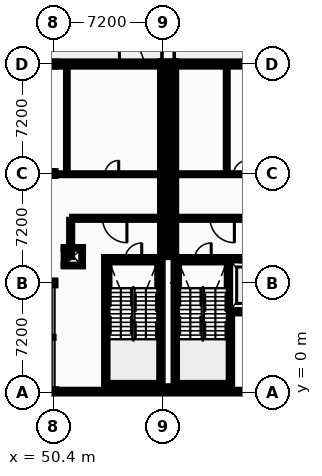
"""IFC4 building model, lengths in metres.
Left out: names, types, materials, properties, quantities, classifications, styles, units other than length and angle.
Written with IfcOpenShell. Run it as: python <this file> out.ifc"""

import sys

from ifc_helpers import new_model, si_unit, direction, frame, frame_2d, origin, origin_2d, place, context, subcontext, project, spatial, rectangle, hollow_circle, i_section, extrude, element, fill, save


model = new_model("IFC4")
c1 = context("Model", 3, precision=1e-05, world=origin(), true_north=direction((0.0, 1.0)))
c2 = subcontext(c1, "Body", "Model", "MODEL_VIEW")
j1 = project(units=[si_unit("LENGTHUNIT", "METRE"), si_unit("PLANEANGLEUNIT", "RADIAN")], contexts=[c1])
p1 = place(None, origin())
s1 = spatial("IfcSite", under=j1, at=p1, CompositionType="ELEMENT")
p2 = place(p1, origin())
s2 = spatial("IfcBuilding", under=s1, at=p2, CompositionType="ELEMENT")
p3 = place(p2, frame((0.0, 0.0, 14.0)))
s3 = spatial("IfcBuildingStorey", under=s2, at=p3, CompositionType="ELEMENT", Elevation=14.0)
p4 = place(p3, frame((50.4, 0.0, 0.0), z_axis=(0.0, 0.0, 1.0), x_axis=(1.0, 0.0, 0.0)))
e1 = element("IfcColumn", 1, at=p4, inside=s3, PredefinedType="COLUMN", context=c2, shape_type="SweptSolid", body=[
    extrude(hollow_circle(Radius=0.203, WallThickness=0.016, at=origin_2d()), origin(), (0.0, 0.0, 1.0), 4.4),
])
for number, where, z_axis, x_axis in (
    (2, (50.4, 7.2, 0.0), (0.0, 0.0, 1.0), (1.0, 0.0, 0.0)),
    (3, (50.4, 14.4, 0.0), (0.0, 0.0, 1.0), (1.0, 0.0, 0.0)),
    (4, (50.4, 21.6, 0.0), (0.0, 0.0, 1.0), (1.0, 0.0, 0.0)),
    (5, (57.6, 0.0, 0.0), (0.0, 0.0, 1.0), (1.0, 0.0, 0.0)),
    (6, (57.6, 14.4, 0.0), (0.0, 0.0, 1.0), (1.0, 0.0, 0.0)),
    (7, (57.6, 21.6, 0.0), (0.0, 0.0, 1.0), (1.0, 0.0, 0.0)),
    (8, (58.32, 0.0, 0.0), (0.0, 0.0, 1.0), (1.0, 0.0, 0.0)),
    (9, (58.32, 14.4, 0.0), (0.0, 0.0, 1.0), (1.0, 0.0, 0.0)),
    (10, (58.32, 21.6, 0.0), (0.0, 0.0, 1.0), (1.0, 0.0, 0.0)),
):
    element("IfcColumn", number, at=place(p3, frame(where, z_axis=z_axis, x_axis=x_axis)), inside=s3, PredefinedType="COLUMN", context=c2, shape_type="SweptSolid", body=[
        extrude(i_section(OverallWidth=0.3, OverallDepth=0.32, WebThickness=0.011, FlangeThickness=0.021, FilletRadius=0.027, at=origin_2d()), origin(), (0.0, 0.0, 1.0), 4.4),
    ])
p5 = place(p3, frame((50.29, 0.0, 0.0), z_axis=(0.0, 0.0, 1.0), x_axis=(1.0, 0.0, 0.0)))
e11 = element("IfcWall", 11, at=p5, inside=s3, PredefinedType="STANDARD", context=c2, shape_type="SweptSolid", body=[
    extrude(rectangle(XDim=7.14, YDim=0.34, at=frame_2d((3.57, 0.0))), origin(), (0.0, 0.0, 1.0), 3.935),
])
p6 = place(p5, frame((1.525, 0.0, 0.95)))
e12 = element("IfcOpeningElement", 12, at=p6, cuts=e11, PredefinedType="OPENING", context=c2, shape_type="SweptSolid", body=[
    extrude(rectangle(XDim=1.234, YDim=1.368, at=frame_2d((0.617, 0.684))), frame((0.0, 0.18, 0.0), z_axis=(0.0, -1.0, 0.0), x_axis=(1.0, 0.0, 0.0)), (0.0, 0.0, 1.0), 0.36),
])
p7 = place(p5, frame((4.381, 0.0, 0.95)))
e13 = element("IfcOpeningElement", 13, at=p7, cuts=e11, PredefinedType="OPENING", context=c2, shape_type="SweptSolid", body=[
    extrude(rectangle(XDim=1.234, YDim=1.368, at=frame_2d((0.617, 0.684))), frame((0.0, 0.18, 0.0), z_axis=(0.0, -1.0, 0.0), x_axis=(1.0, 0.0, 0.0)), (0.0, 0.0, 1.0), 0.36),
])
p8 = place(p3, frame((57.43, 21.6, 0.0), z_axis=(0.0, 0.0, 1.0), x_axis=(-1.0, 0.0, 0.0)))
e14 = element("IfcWall", 14, at=p8, inside=s3, PredefinedType="STANDARD", context=c2, shape_type="SweptSolid", body=[
    extrude(rectangle(XDim=7.14, YDim=0.34, at=frame_2d((3.57, 0.0))), origin(), (0.0, 0.0, 1.0), 3.935),
])
p9 = place(p8, frame((1.072, 0.0, 0.0)))
e15 = element("IfcOpeningElement", 15, at=p9, cuts=e14, PredefinedType="OPENING", context=c2, shape_type="SweptSolid", body=[
    extrude(rectangle(XDim=1.6, YDim=2.2, at=frame_2d((0.8, 1.1))), frame((0.0, 0.18, 0.0), z_axis=(0.0, -1.0, 0.0), x_axis=(1.0, 0.0, 0.0)), (0.0, 0.0, 1.0), 0.36),
])
p10 = place(p3, frame((57.6, -0.17, 0.0), z_axis=(0.0, 0.0, 1.0), x_axis=(0.0, 1.0, 0.0)))
e16 = element("IfcWall", 16, at=p10, inside=s3, PredefinedType="STANDARD", context=c2, shape_type="SweptSolid", body=[
    extrude(rectangle(XDim=0.57, YDim=0.34, at=frame_2d((0.285, 0.0))), origin(), (0.0, 0.0, 1.0), 4.2),
])
p11 = place(p3, frame((57.6, 8.9, 0.0), z_axis=(0.0, 0.0, 1.0), x_axis=(0.0, 1.0, 0.0)))
e17 = element("IfcWall", 17, at=p11, inside=s3, PredefinedType="STANDARD", context=c2, shape_type="SweptSolid", body=[
    extrude(rectangle(XDim=5.5, YDim=0.34, at=frame_2d((2.75, 0.0))), origin(), (0.0, 0.0, 1.0), 4.2),
])
p12 = place(p3, frame((57.6, 14.4, 0.0), z_axis=(0.0, 0.0, 1.0), x_axis=(0.0, 1.0, 0.0)))
e18 = element("IfcWall", 18, at=p12, inside=s3, PredefinedType="STANDARD", context=c2, shape_type="SweptSolid", body=[
    extrude(rectangle(XDim=7.37, YDim=0.34, at=frame_2d((3.685, 0.0))), origin(), (0.0, 0.0, 1.0), 3.895),
])
p13 = place(p12, frame((1.679, 0.0, 0.95)))
e19 = element("IfcOpeningElement", 19, at=p13, cuts=e18, PredefinedType="OPENING", context=c2, shape_type="SweptSolid", body=[
    extrude(rectangle(XDim=1.064, YDim=1.404, at=frame_2d((0.532, 0.702))), frame((0.0, 0.18, 0.0), z_axis=(0.0, -1.0, 0.0), x_axis=(1.0, 0.0, 0.0)), (0.0, 0.0, 1.0), 0.36),
])
p14 = place(p12, frame((4.627, 0.0, 0.95)))
e20 = element("IfcOpeningElement", 20, at=p14, cuts=e18, PredefinedType="OPENING", context=c2, shape_type="SweptSolid", body=[
    extrude(rectangle(XDim=1.064, YDim=1.404, at=frame_2d((0.532, 0.702))), frame((0.0, 0.18, 0.0), z_axis=(0.0, -1.0, 0.0), x_axis=(1.0, 0.0, 0.0)), (0.0, 0.0, 1.0), 0.36),
])
p15 = place(p3, frame((58.49, 0.0, 0.0), z_axis=(0.0, 0.0, 1.0), x_axis=(1.0, 0.0, 0.0)))
e21 = element("IfcWall", 21, at=p15, inside=s3, PredefinedType="STANDARD", context=c2, shape_type="SweptSolid", body=[
    extrude(rectangle(XDim=6.31, YDim=0.34, at=frame_2d((3.155, 0.0))), origin(), (0.0, 0.0, 1.0), 3.935),
])
p16 = place(p3, frame((64.91, 21.6, 0.0), z_axis=(0.0, 0.0, 1.0), x_axis=(-1.0, 0.0, 0.0)))
e22 = element("IfcWall", 22, at=p16, inside=s3, PredefinedType="STANDARD", context=c2, shape_type="SweptSolid", body=[
    extrude(rectangle(XDim=6.42, YDim=0.34, at=frame_2d((3.21, 0.0))), origin(), (0.0, 0.0, 1.0), 3.935),
])
p17 = place(p3, frame((58.32, 0.4, 0.0), z_axis=(0.0, 0.0, 1.0), x_axis=(0.0, -1.0, 0.0)))
e23 = element("IfcWall", 23, at=p17, inside=s3, PredefinedType="STANDARD", context=c2, shape_type="SweptSolid", body=[
    extrude(rectangle(XDim=0.57, YDim=0.34, at=frame_2d((0.285, 0.0))), origin(), (0.0, 0.0, 1.0), 4.2),
])
p18 = place(p3, frame((58.32, 14.4, 0.0), z_axis=(0.0, 0.0, 1.0), x_axis=(0.0, -1.0, 0.0)))
e24 = element("IfcWall", 24, at=p18, inside=s3, PredefinedType="STANDARD", context=c2, shape_type="SweptSolid", body=[
    extrude(rectangle(XDim=5.5, YDim=0.34, at=frame_2d((2.75, 0.0))), origin(), (0.0, 0.0, 1.0), 4.2),
])
p19 = place(p3, frame((58.32, 21.77, 0.0), z_axis=(0.0, 0.0, 1.0), x_axis=(0.0, -1.0, 0.0)))
e25 = element("IfcWall", 25, at=p19, inside=s3, PredefinedType="STANDARD", context=c2, shape_type="SweptSolid", body=[
    extrude(rectangle(XDim=7.37, YDim=0.34, at=frame_2d((3.685, 0.0))), origin(), (0.0, 0.0, 1.0), 3.895),
])
p20 = place(p19, frame((1.764, 0.0, 0.95)))
e26 = element("IfcOpeningElement", 26, at=p20, cuts=e25, PredefinedType="OPENING", context=c2, shape_type="SweptSolid", body=[
    extrude(rectangle(XDim=0.894, YDim=1.368, at=frame_2d((0.447, 0.684))), frame((0.0, 0.18, 0.0), z_axis=(0.0, -1.0, 0.0), x_axis=(1.0, 0.0, 0.0)), (0.0, 0.0, 1.0), 0.36),
])
p21 = place(p19, frame((4.712, 0.0, 0.95)))
e27 = element("IfcOpeningElement", 27, at=p21, cuts=e25, PredefinedType="OPENING", context=c2, shape_type="SweptSolid", body=[
    extrude(rectangle(XDim=0.894, YDim=1.368, at=frame_2d((0.447, 0.684))), frame((0.0, 0.18, 0.0), z_axis=(0.0, -1.0, 0.0), x_axis=(1.0, 0.0, 0.0)), (0.0, 0.0, 1.0), 0.36),
])
p22 = place(p3, frame((54.1, 0.575, 0.0), z_axis=(0.0, 0.0, 1.0), x_axis=(1.0, 0.0, 0.0)))
e28 = element("IfcWall", 28, at=p22, inside=s3, PredefinedType="SHEAR", context=c2, shape_type="SweptSolid", body=[
    extrude(rectangle(XDim=3.15, YDim=0.35, at=frame_2d((1.575, 0.0))), origin(), (0.0, 0.0, 1.0), 4.2),
])
p23 = place(p3, frame((54.1, 8.725, 0.0), z_axis=(0.0, 0.0, 1.0), x_axis=(1.0, 0.0, 0.0)))
e29 = element("IfcWall", 29, at=p23, inside=s3, PredefinedType="SHEAR", context=c2, shape_type="SweptSolid", body=[
    extrude(rectangle(XDim=3.15, YDim=0.35, at=frame_2d((1.575, 0.0))), origin(), (0.0, 0.0, 1.0), 4.2),
])
p24 = place(p23, frame((1.025, 0.0, 0.0)))
e30 = element("IfcOpeningElement", 30, at=p24, cuts=e29, PredefinedType="OPENING", context=c2, shape_type="SweptSolid", body=[
    extrude(rectangle(XDim=1.1, YDim=2.15, at=frame_2d((0.55, 1.075))), frame((0.0, 0.185, 0.0), z_axis=(0.0, -1.0, 0.0), x_axis=(1.0, 0.0, 0.0)), (0.0, 0.0, 1.0), 0.37),
])
for number, where, z_axis, x_axis in (
    (31, (53.925, 0.4, 0.0), (0.0, 0.0, 1.0), (0.0, 1.0, 0.0)),
    (32, (57.425, 0.4, 0.0), (0.0, 0.0, 1.0), (0.0, 1.0, 0.0)),
):
    element("IfcWall", number, at=place(p3, frame(where, z_axis=z_axis, x_axis=x_axis)), inside=s3, PredefinedType="SHEAR", context=c2, shape_type="SweptSolid", body=[
        extrude(rectangle(XDim=8.5, YDim=0.35, at=frame_2d((4.25, 0.0))), origin(), (0.0, 0.0, 1.0), 4.2),
    ])
p25 = place(p3, frame((51.65, 11.45, 0.0), z_axis=(0.0, 0.0, 1.0), x_axis=(1.0, 0.0, 0.0)))
e33 = element("IfcWall", 33, at=p25, inside=s3, PredefinedType="PARTITIONING", context=c2, shape_type="SweptSolid", body=[
    extrude(rectangle(XDim=5.6, YDim=0.2, at=frame_2d((2.8, 0.0))), origin(), (0.0, 0.0, 1.0), 4.2),
])
p26 = place(p25, frame((2.0, 0.0, 0.0)))
e34 = element("IfcOpeningElement", 34, at=p26, cuts=e33, PredefinedType="OPENING", context=c2, shape_type="SweptSolid", body=[
    extrude(rectangle(XDim=1.6, YDim=2.2, at=frame_2d((0.8, 1.1))), frame((0.0, 0.11, 0.0), z_axis=(0.0, -1.0, 0.0), x_axis=(1.0, 0.0, 0.0)), (0.0, 0.0, 1.0), 0.22),
])
p27 = place(p3, frame((51.55, 8.9, 0.0), z_axis=(0.0, 0.0, 1.0), x_axis=(0.0, 1.0, 0.0)))
e35 = element("IfcWall", 35, at=p27, inside=s3, PredefinedType="PARTITIONING", context=c2, shape_type="SweptSolid", body=[
    extrude(rectangle(XDim=2.45, YDim=0.2, at=frame_2d((1.225, 0.0))), origin(), (0.0, 0.0, 1.0), 4.2),
])
p28 = place(p3, frame((58.67, 0.575, 0.0), z_axis=(0.0, 0.0, 1.0), x_axis=(1.0, 0.0, 0.0)))
e36 = element("IfcWall", 36, at=p28, inside=s3, PredefinedType="SHEAR", context=c2, shape_type="SweptSolid", body=[
    extrude(rectangle(XDim=3.15, YDim=0.35, at=frame_2d((1.575, 0.0))), origin(), (0.0, 0.0, 1.0), 4.2),
])
p29 = place(p3, frame((58.67, 8.725, 0.0), z_axis=(0.0, 0.0, 1.0), x_axis=(1.0, 0.0, 0.0)))
e37 = element("IfcWall", 37, at=p29, inside=s3, PredefinedType="SHEAR", context=c2, shape_type="SweptSolid", body=[
    extrude(rectangle(XDim=3.15, YDim=0.35, at=frame_2d((1.575, 0.0))), origin(), (0.0, 0.0, 1.0), 4.2),
])
p30 = place(p29, frame((1.025, 0.0, 0.0)))
e38 = element("IfcOpeningElement", 38, at=p30, cuts=e37, PredefinedType="OPENING", context=c2, shape_type="SweptSolid", body=[
    extrude(rectangle(XDim=1.1, YDim=2.15, at=frame_2d((0.55, 1.075))), frame((0.0, 0.185, 0.0), z_axis=(0.0, -1.0, 0.0), x_axis=(1.0, 0.0, 0.0)), (0.0, 0.0, 1.0), 0.37),
])
for number, where, z_axis, x_axis in (
    (39, (58.495, 0.4, 0.0), (0.0, 0.0, 1.0), (0.0, 1.0, 0.0)),
    (40, (61.995, 0.4, 0.0), (0.0, 0.0, 1.0), (0.0, 1.0, 0.0)),
):
    element("IfcWall", number, at=place(p3, frame(where, z_axis=z_axis, x_axis=x_axis)), inside=s3, PredefinedType="SHEAR", context=c2, shape_type="SweptSolid", body=[
        extrude(rectangle(XDim=8.5, YDim=0.35, at=frame_2d((4.25, 0.0))), origin(), (0.0, 0.0, 1.0), 4.2),
    ])
p31 = place(p3, frame((62.17, 5.375, 0.0), z_axis=(0.0, 0.0, 1.0), x_axis=(1.0, 0.0, 0.0)))
e41 = element("IfcWall", 41, at=p31, inside=s3, PredefinedType="SHEAR", context=c2, shape_type="SweptSolid", body=[
    extrude(rectangle(XDim=2.2, YDim=0.35, at=frame_2d((1.1, 0.0))), origin(), (0.0, 0.0, 1.0), 4.2),
])
p32 = place(p3, frame((62.17, 8.725, 0.0), z_axis=(0.0, 0.0, 1.0), x_axis=(1.0, 0.0, 0.0)))
e42 = element("IfcWall", 42, at=p32, inside=s3, PredefinedType="SHEAR", context=c2, shape_type="SweptSolid", body=[
    extrude(rectangle(XDim=2.2, YDim=0.35, at=frame_2d((1.1, 0.0))), origin(), (0.0, 0.0, 1.0), 4.2),
])
p33 = place(p32, frame((0.5, 0.0, 0.0)))
e43 = element("IfcOpeningElement", 43, at=p33, cuts=e42, PredefinedType="OPENING", context=c2, shape_type="SweptSolid", body=[
    extrude(rectangle(XDim=1.2, YDim=2.2, at=frame_2d((0.6, 1.1))), frame((0.0, 0.185, 0.0), z_axis=(0.0, -1.0, 0.0), x_axis=(1.0, 0.0, 0.0)), (0.0, 0.0, 1.0), 0.37),
])
p34 = place(p3, frame((58.67, 11.45, 0.0), z_axis=(0.0, 0.0, 1.0), x_axis=(1.0, 0.0, 0.0)))
e44 = element("IfcWall", 44, at=p34, inside=s3, PredefinedType="PARTITIONING", context=c2, shape_type="SweptSolid", body=[
    extrude(rectangle(XDim=5.7, YDim=0.2, at=frame_2d((2.85, 0.0))), origin(), (0.0, 0.0, 1.0), 4.2),
])
p35 = place(p34, frame((2.05, 0.0, 0.0)))
e45 = element("IfcOpeningElement", 45, at=p35, cuts=e44, PredefinedType="OPENING", context=c2, shape_type="SweptSolid", body=[
    extrude(rectangle(XDim=1.6, YDim=2.2, at=frame_2d((0.8, 1.1))), frame((0.0, 0.11, 0.0), z_axis=(0.0, -1.0, 0.0), x_axis=(1.0, 0.0, 0.0)), (0.0, 0.0, 1.0), 0.22),
])
for number, where, z_axis, x_axis in (
    (46, (51.09, 8.345, 0.0), (0.0, 0.0, 1.0), (1.0, 0.0, 0.0)),
    (47, (51.09, 9.505, 0.0), (0.0, 0.0, 1.0), (1.0, 0.0, 0.0)),
):
    element("IfcWall", number, at=place(p3, frame(where, z_axis=z_axis, x_axis=x_axis)), inside=s3, PredefinedType="PARTITIONING", context=c2, shape_type="SweptSolid", body=[
        extrude(rectangle(XDim=1.27, YDim=0.11, at=frame_2d((0.635, 0.0))), origin(), (0.0, 0.0, 1.0), 4.2),
    ])
for number, where, z_axis, x_axis in (
    (48, (51.145, 8.4, 0.0), (0.0, 0.0, 1.0), (0.0, 1.0, 0.0)),
    (49, (52.305, 8.4, 0.0), (0.0, 0.0, 1.0), (0.0, 1.0, 0.0)),
):
    element("IfcWall", number, at=place(p3, frame(where, z_axis=z_axis, x_axis=x_axis)), inside=s3, PredefinedType="PARTITIONING", context=c2, shape_type="SweptSolid", body=[
        extrude(rectangle(XDim=1.05, YDim=0.11, at=frame_2d((0.525, 0.0))), origin(), (0.0, 0.0, 1.0), 4.2),
    ])
p36 = place(p3, frame((50.78, 14.35, 0.0), z_axis=(0.0, 0.0, 1.0), x_axis=(1.0, 0.0, 0.0)))
e50 = element("IfcWall", 50, at=p36, inside=s3, PredefinedType="PARTITIONING", context=c2, shape_type="SweptSolid", body=[
    extrude(rectangle(XDim=6.44, YDim=0.125, at=frame_2d((3.22, 0.0))), origin(), (0.0, 0.0, 1.0), 3.935),
])
p37 = place(p36, frame((3.03, 0.0, 0.0)))
e51 = element("IfcOpeningElement", 51, at=p37, cuts=e50, PredefinedType="OPENING", context=c2, shape_type="SweptSolid", body=[
    extrude(rectangle(XDim=0.9, YDim=2.1, at=frame_2d((0.45, 1.05))), frame((0.0, 0.073, 0.0), z_axis=(0.0, -1.0, 0.0), x_axis=(1.0, 0.0, 0.0)), (0.0, 0.0, 1.0), 0.145),
])
p38 = place(p3, frame((58.7, 14.35, 0.0), z_axis=(0.0, 0.0, 1.0), x_axis=(1.0, 0.0, 0.0)))
e52 = element("IfcWall", 52, at=p38, inside=s3, PredefinedType="PARTITIONING", context=c2, shape_type="SweptSolid", body=[
    extrude(rectangle(XDim=5.72, YDim=0.125, at=frame_2d((2.86, 0.0))), origin(), (0.0, 0.0, 1.0), 3.935),
])
p39 = place(p38, frame((1.67, 0.0, 0.0)))
e53 = element("IfcOpeningElement", 53, at=p39, cuts=e52, PredefinedType="OPENING", context=c2, shape_type="SweptSolid", body=[
    extrude(rectangle(XDim=1.0, YDim=2.1, at=frame_2d((0.5, 1.05))), frame((0.0, 0.073, 0.0), z_axis=(0.0, -1.0, 0.0), x_axis=(1.0, 0.0, 0.0)), (0.0, 0.0, 1.0), 0.145),
])
p40 = place(p38, frame((3.57, 0.0, 0.0)))
e54 = element("IfcOpeningElement", 54, at=p40, cuts=e52, PredefinedType="OPENING", context=c2, shape_type="SweptSolid", body=[
    extrude(rectangle(XDim=0.9, YDim=2.1, at=frame_2d((0.45, 1.05))), frame((0.0, 0.073, 0.0), z_axis=(0.0, -1.0, 0.0), x_axis=(1.0, 0.0, 0.0)), (0.0, 0.0, 1.0), 0.145),
])
p41 = place(p3, frame((51.3, 14.413, 0.0), z_axis=(0.0, 0.0, 1.0), x_axis=(0.0, 1.0, 0.0)))
e55 = element("IfcWall", 55, at=p41, inside=s3, PredefinedType="PARTITIONING", context=c2, shape_type="SweptSolid", body=[
    extrude(rectangle(XDim=6.987, YDim=0.11, at=frame_2d((3.494, 0.0))), origin(), (0.0, 0.0, 1.0), 4.2),
])
p42 = place(p3, frame((61.82, 14.413, 0.0), z_axis=(0.0, 0.0, 1.0), x_axis=(0.0, 1.0, 0.0)))
e56 = element("IfcWall", 56, at=p42, inside=s3, PredefinedType="PARTITIONING", context=c2, shape_type="SweptSolid", body=[
    extrude(rectangle(XDim=6.987, YDim=0.125, at=frame_2d((3.494, 0.0))), origin(), (0.0, 0.0, 1.0), 4.2),
])
p43 = place(p6, origin())
e57 = element("IfcWindow", 57, at=p43, inside=s3, PartitioningType="SINGLE_PANEL", PredefinedType="WINDOW", context=c2, shape_type="SweptSolid", body=[
    extrude(rectangle(XDim=1.234, YDim=1.368, at=frame_2d((0.617, 0.684))), frame((0.0, 0.03, 0.0), z_axis=(0.0, -1.0, 0.0), x_axis=(1.0, 0.0, 0.0)), (0.0, 0.0, 1.0), 0.06),
])
fill(e12, e57)
p44 = place(p7, origin())
e58 = element("IfcWindow", 58, at=p44, inside=s3, PartitioningType="SINGLE_PANEL", PredefinedType="WINDOW", context=c2, shape_type="SweptSolid", body=[
    extrude(rectangle(XDim=1.234, YDim=1.368, at=frame_2d((0.617, 0.684))), frame((0.0, 0.03, 0.0), z_axis=(0.0, -1.0, 0.0), x_axis=(1.0, 0.0, 0.0)), (0.0, 0.0, 1.0), 0.06),
])
fill(e13, e58)
p45 = place(p13, origin())
e59 = element("IfcWindow", 59, at=p45, inside=s3, PartitioningType="SINGLE_PANEL", PredefinedType="WINDOW", context=c2, shape_type="SweptSolid", body=[
    extrude(rectangle(XDim=1.064, YDim=1.404, at=frame_2d((0.532, 0.702))), frame((0.0, 0.03, 0.0), z_axis=(0.0, -1.0, 0.0), x_axis=(1.0, 0.0, 0.0)), (0.0, 0.0, 1.0), 0.06),
])
fill(e19, e59)
p46 = place(p14, origin())
e60 = element("IfcWindow", 60, at=p46, inside=s3, PartitioningType="SINGLE_PANEL", PredefinedType="WINDOW", context=c2, shape_type="SweptSolid", body=[
    extrude(rectangle(XDim=1.064, YDim=1.404, at=frame_2d((0.532, 0.702))), frame((0.0, 0.03, 0.0), z_axis=(0.0, -1.0, 0.0), x_axis=(1.0, 0.0, 0.0)), (0.0, 0.0, 1.0), 0.06),
])
fill(e20, e60)
p47 = place(p20, origin())
e61 = element("IfcWindow", 61, at=p47, inside=s3, PartitioningType="SINGLE_PANEL", PredefinedType="WINDOW", context=c2, shape_type="SweptSolid", body=[
    extrude(rectangle(XDim=0.894, YDim=1.368, at=frame_2d((0.447, 0.684))), frame((0.0, 0.03, 0.0), z_axis=(0.0, -1.0, 0.0), x_axis=(1.0, 0.0, 0.0)), (0.0, 0.0, 1.0), 0.06),
])
fill(e26, e61)
p48 = place(p21, origin())
e62 = element("IfcWindow", 62, at=p48, inside=s3, PartitioningType="SINGLE_PANEL", PredefinedType="WINDOW", context=c2, shape_type="SweptSolid", body=[
    extrude(rectangle(XDim=0.894, YDim=1.368, at=frame_2d((0.447, 0.684))), frame((0.0, 0.03, 0.0), z_axis=(0.0, -1.0, 0.0), x_axis=(1.0, 0.0, 0.0)), (0.0, 0.0, 1.0), 0.06),
])
fill(e27, e62)
p49 = place(p9, origin())
e63 = element("IfcDoor", 63, at=p49, inside=s3, OperationType="DOUBLE_DOOR_SINGLE_SWING", PredefinedType="DOOR", context=c2, shape_type="SweptSolid", body=[
    extrude(rectangle(XDim=1.6, YDim=2.2, at=frame_2d((0.8, 1.1))), frame((0.0, 0.025, 0.0), z_axis=(0.0, -1.0, 0.0), x_axis=(1.0, 0.0, 0.0)), (0.0, 0.0, 1.0), 0.05),
])
fill(e15, e63)
p50 = place(p24, frame((1.1, 0.0, 0.0), z_axis=(0.0, 0.0, 1.0), x_axis=(-1.0, 0.0, 0.0)))
e64 = element("IfcDoor", 64, at=p50, inside=s3, OperationType="SINGLE_SWING_RIGHT", PredefinedType="DOOR", context=c2, shape_type="SweptSolid", body=[
    extrude(rectangle(XDim=1.1, YDim=2.15, at=frame_2d((0.55, 1.075))), frame((0.0, 0.025, 0.0), z_axis=(0.0, -1.0, 0.0), x_axis=(1.0, 0.0, 0.0)), (0.0, 0.0, 1.0), 0.05),
])
fill(e30, e64)
p51 = place(p26, origin())
e65 = element("IfcDoor", 65, at=p51, inside=s3, OperationType="DOUBLE_DOOR_SINGLE_SWING", PredefinedType="DOOR", context=c2, shape_type="SweptSolid", body=[
    extrude(rectangle(XDim=1.6, YDim=2.2, at=frame_2d((0.8, 1.1))), frame((0.0, 0.025, 0.0), z_axis=(0.0, -1.0, 0.0), x_axis=(1.0, 0.0, 0.0)), (0.0, 0.0, 1.0), 0.05),
])
fill(e34, e65)
p52 = place(p30, frame((1.1, 0.0, 0.0), z_axis=(0.0, 0.0, 1.0), x_axis=(-1.0, 0.0, 0.0)))
e66 = element("IfcDoor", 66, at=p52, inside=s3, OperationType="SINGLE_SWING_RIGHT", PredefinedType="DOOR", context=c2, shape_type="SweptSolid", body=[
    extrude(rectangle(XDim=1.1, YDim=2.15, at=frame_2d((0.55, 1.075))), frame((0.0, 0.025, 0.0), z_axis=(0.0, -1.0, 0.0), x_axis=(1.0, 0.0, 0.0)), (0.0, 0.0, 1.0), 0.05),
])
fill(e38, e66)
p53 = place(p33, origin())
e67 = element("IfcDoor", 67, at=p53, inside=s3, OperationType="SLIDING_TO_RIGHT", PredefinedType="DOOR", context=c2, shape_type="SweptSolid", body=[
    extrude(rectangle(XDim=1.2, YDim=2.2, at=frame_2d((0.6, 1.1))), frame((0.0, 0.025, 0.0), z_axis=(0.0, -1.0, 0.0), x_axis=(1.0, 0.0, 0.0)), (0.0, 0.0, 1.0), 0.05),
])
fill(e43, e67)
p54 = place(p35, origin())
e68 = element("IfcDoor", 68, at=p54, inside=s3, OperationType="DOUBLE_DOOR_SINGLE_SWING", PredefinedType="DOOR", context=c2, shape_type="SweptSolid", body=[
    extrude(rectangle(XDim=1.6, YDim=2.2, at=frame_2d((0.8, 1.1))), frame((0.0, 0.025, 0.0), z_axis=(0.0, -1.0, 0.0), x_axis=(1.0, 0.0, 0.0)), (0.0, 0.0, 1.0), 0.05),
])
fill(e45, e68)
p55 = place(p37, frame((0.9, 0.0, 0.0), z_axis=(0.0, 0.0, 1.0), x_axis=(-1.0, 0.0, 0.0)))
e69 = element("IfcDoor", 69, at=p55, inside=s3, OperationType="SINGLE_SWING_RIGHT", PredefinedType="DOOR", context=c2, shape_type="SweptSolid", body=[
    extrude(rectangle(XDim=0.9, YDim=2.1, at=frame_2d((0.45, 1.05))), frame((0.0, 0.025, 0.0), z_axis=(0.0, -1.0, 0.0), x_axis=(1.0, 0.0, 0.0)), (0.0, 0.0, 1.0), 0.05),
])
fill(e51, e69)
p56 = place(p39, frame((1.0, 0.0, 0.0), z_axis=(0.0, 0.0, 1.0), x_axis=(-1.0, 0.0, 0.0)))
e70 = element("IfcDoor", 70, at=p56, inside=s3, OperationType="SLIDING_TO_LEFT", PredefinedType="DOOR", context=c2, shape_type="SweptSolid", body=[
    extrude(rectangle(XDim=1.0, YDim=2.1, at=frame_2d((0.5, 1.05))), frame((0.0, 0.025, 0.0), z_axis=(0.0, -1.0, 0.0), x_axis=(1.0, 0.0, 0.0)), (0.0, 0.0, 1.0), 0.05),
])
fill(e53, e70)
p57 = place(p40, frame((0.9, 0.0, 0.0), z_axis=(0.0, 0.0, 1.0), x_axis=(-1.0, 0.0, 0.0)))
e71 = element("IfcDoor", 71, at=p57, inside=s3, OperationType="SINGLE_SWING_RIGHT", PredefinedType="DOOR", context=c2, shape_type="SweptSolid", body=[
    extrude(rectangle(XDim=0.9, YDim=2.1, at=frame_2d((0.45, 1.05))), frame((0.0, 0.025, 0.0), z_axis=(0.0, -1.0, 0.0), x_axis=(1.0, 0.0, 0.0)), (0.0, 0.0, 1.0), 0.05),
])
fill(e54, e71)
save(model, sys.argv[1])
